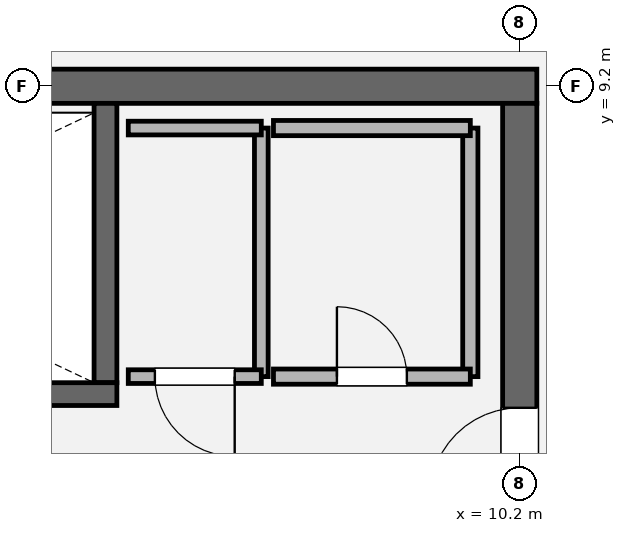
"""IFC4 building model, lengths in metres.
Left out: names, types, materials, properties, quantities, classifications, styles, units other than length and angle.
Written with IfcOpenShell. Run it as: python <this file> out.ifc"""

import sys

from ifc_helpers import new_model, si_unit, direction, frame, frame_2d, origin, place, context, subcontext, project, spatial, rectangle, extrude, element, fill, save


model = new_model("IFC4")
c1 = context("Model", 3, precision=1e-05, world=origin(), true_north=direction((0.0, 1.0)))
c2 = subcontext(c1, "Body", "Model", "MODEL_VIEW")
j1 = project(units=[si_unit("LENGTHUNIT", "METRE"), si_unit("PLANEANGLEUNIT", "RADIAN")], contexts=[c1])
p1 = place(None, origin())
s1 = spatial("IfcSite", under=j1, at=p1, CompositionType="ELEMENT")
p2 = place(p1, origin())
s2 = spatial("IfcBuilding", under=s1, at=p2, CompositionType="ELEMENT")
p3 = place(p2, frame((0.0, 0.0, 317.4)))
s3 = spatial("IfcBuildingStorey", under=s2, at=p3, CompositionType="ELEMENT", Elevation=317.4)
p4 = place(p3, frame((-10.425, 9.2, 0.0), z_axis=(0.0, 0.0, 1.0), x_axis=(1.0, 0.0, 0.0)))
e1 = element("IfcWall", 1, at=p4, inside=s3, PredefinedType="SHEAR", context=c2, shape_type="SweptSolid", body=[
    extrude(rectangle(XDim=20.85, YDim=0.45, at=frame_2d((10.425, 0.0))), origin(), (0.0, 0.0, 1.0), 4.2),
])
p5 = place(p3, frame((10.2, 8.975, 0.0), z_axis=(0.0, 0.0, 1.0), x_axis=(0.0, -1.0, 0.0)))
e2 = element("IfcWall", 2, at=p5, inside=s3, PredefinedType="SHEAR", context=c2, shape_type="SweptSolid", body=[
    extrude(rectangle(XDim=17.95, YDim=0.45, at=frame_2d((8.975, 0.0))), origin(), (0.0, 0.0, 1.0), 4.2),
])
p6 = place(p5, frame((4.005, 0.0, 0.0)))
e3 = element("IfcOpeningElement", 3, at=p6, cuts=e2, PredefinedType="OPENING", context=c2, shape_type="SweptSolid", body=[
    extrude(rectangle(XDim=1.18, YDim=2.2, at=frame_2d((0.59, 1.1))), frame((0.0, 0.235, 0.0), z_axis=(0.0, -1.0, 0.0), x_axis=(1.0, 0.0, 0.0)), (0.0, 0.0, 1.0), 0.47),
])
p7 = place(p3, frame((4.75, 8.975, 0.0), z_axis=(0.0, 0.0, 1.0), x_axis=(0.0, -1.0, 0.0)))
e4 = element("IfcWall", 4, at=p7, inside=s3, PredefinedType="SOLIDWALL", context=c2, shape_type="SweptSolid", body=[
    extrude(rectangle(XDim=3.675, YDim=0.3, at=frame_2d((1.837, 0.0))), origin(), (0.0, 0.0, 1.0), 4.2),
])
p8 = place(p3, frame((-4.9, 5.15, 0.0), z_axis=(0.0, 0.0, 1.0), x_axis=(1.0, 0.0, 0.0)))
e5 = element("IfcWall", 5, at=p8, inside=s3, PredefinedType="SOLIDWALL", context=c2, shape_type="SweptSolid", body=[
    extrude(rectangle(XDim=9.8, YDim=0.3, at=frame_2d((4.9, 0.0))), origin(), (0.0, 0.0, 1.0), 4.2),
])
p9 = place(p8, frame((0.56, 0.0, 0.0)))
e6 = element("IfcOpeningElement", 6, at=p9, cuts=e5, PredefinedType="OPENING", context=c2, shape_type="SweptSolid", body=[
    extrude(rectangle(XDim=1.18, YDim=2.2, at=frame_2d((0.59, 1.1))), frame((0.0, 0.16, 0.0), z_axis=(0.0, -1.0, 0.0), x_axis=(1.0, 0.0, 0.0)), (0.0, 0.0, 1.0), 0.32),
])
p10 = place(p3, frame((6.8, 5.38, 0.0), z_axis=(0.0, 0.0, 1.0), x_axis=(0.0, 1.0, 0.0)))
e7 = element("IfcWall", 7, at=p10, inside=s3, PredefinedType="PARTITIONING", context=c2, shape_type="SweptSolid", body=[
    extrude(rectangle(XDim=3.27, YDim=0.18, at=frame_2d((1.635, 0.0))), origin(), (0.0, 0.0, 1.0), 4.0),
])
p11 = place(p3, frame((6.8, 8.65, 0.0), z_axis=(0.0, 0.0, 1.0), x_axis=(-1.0, 0.0, 0.0)))
e8 = element("IfcWall", 8, at=p11, inside=s3, PredefinedType="PARTITIONING", context=c2, shape_type="SweptSolid", body=[
    extrude(rectangle(XDim=1.75, YDim=0.18, at=frame_2d((0.875, 0.0))), origin(), (0.0, 0.0, 1.0), 4.0),
])
p12 = place(p3, frame((5.05, 5.38, 0.0), z_axis=(0.0, 0.0, 1.0), x_axis=(1.0, 0.0, 0.0)))
e9 = element("IfcWall", 9, at=p12, inside=s3, PredefinedType="PARTITIONING", context=c2, shape_type="SweptSolid", body=[
    extrude(rectangle(XDim=1.75, YDim=0.18, at=frame_2d((0.875, 0.0))), origin(), (0.0, 0.0, 1.0), 4.0),
])
p13 = place(p12, frame((0.35, 0.0, 0.0)))
e10 = element("IfcOpeningElement", 10, at=p13, cuts=e9, PredefinedType="OPENING", context=c2, shape_type="SweptSolid", body=[
    extrude(rectangle(XDim=1.05, YDim=2.2, at=frame_2d((0.525, 1.1))), frame((0.0, 0.1, 0.0), z_axis=(0.0, -1.0, 0.0), x_axis=(1.0, 0.0, 0.0)), (0.0, 0.0, 1.0), 0.2),
])
p14 = place(p3, frame((9.55, 5.38, 0.0), z_axis=(0.0, 0.0, 1.0), x_axis=(0.0, 1.0, 0.0)))
e11 = element("IfcWall", 11, at=p14, inside=s3, PredefinedType="SOLIDWALL", context=c2, shape_type="SweptSolid", body=[
    extrude(rectangle(XDim=3.27, YDim=0.2, at=frame_2d((1.635, 0.0))), origin(), (0.0, 0.0, 1.0), 4.0),
])
p15 = place(p3, frame((9.55, 8.65, 0.0), z_axis=(0.0, 0.0, 1.0), x_axis=(-1.0, 0.0, 0.0)))
e12 = element("IfcWall", 12, at=p15, inside=s3, PredefinedType="SOLIDWALL", context=c2, shape_type="SweptSolid", body=[
    extrude(rectangle(XDim=2.59, YDim=0.2, at=frame_2d((1.295, 0.0))), origin(), (0.0, 0.0, 1.0), 4.0),
])
p16 = place(p3, frame((6.96, 5.38, 0.0), z_axis=(0.0, 0.0, 1.0), x_axis=(1.0, 0.0, 0.0)))
e13 = element("IfcWall", 13, at=p16, inside=s3, PredefinedType="SOLIDWALL", context=c2, shape_type="SweptSolid", body=[
    extrude(rectangle(XDim=2.59, YDim=0.2, at=frame_2d((1.295, 0.0))), origin(), (0.0, 0.0, 1.0), 4.0),
])
p17 = place(p16, frame((0.835, 0.0, 0.0)))
e14 = element("IfcOpeningElement", 14, at=p17, cuts=e13, PredefinedType="OPENING", context=c2, shape_type="SweptSolid", body=[
    extrude(rectangle(XDim=0.92, YDim=2.1, at=frame_2d((0.46, 1.05))), frame((0.0, 0.11, 0.0), z_axis=(0.0, -1.0, 0.0), x_axis=(1.0, 0.0, 0.0)), (0.0, 0.0, 1.0), 0.22),
])
p18 = place(p6, origin())
e15 = element("IfcDoor", 15, at=p18, inside=s3, OperationType="SINGLE_SWING_RIGHT", PredefinedType="DOOR", context=c2, shape_type="SweptSolid", body=[
    extrude(rectangle(XDim=1.18, YDim=2.2, at=frame_2d((0.59, 1.1))), frame((0.0, 0.025, 0.0), z_axis=(0.0, -1.0, 0.0), x_axis=(1.0, 0.0, 0.0)), (0.0, 0.0, 1.0), 0.05),
])
fill(e3, e15)
p19 = place(p13, origin())
e16 = element("IfcDoor", 16, at=p19, inside=s3, OperationType="SINGLE_SWING_RIGHT", PredefinedType="DOOR", context=c2, shape_type="SweptSolid", body=[
    extrude(rectangle(XDim=1.05, YDim=2.2, at=frame_2d((0.525, 1.1))), frame((0.0, 0.025, 0.0), z_axis=(0.0, -1.0, 0.0), x_axis=(1.0, 0.0, 0.0)), (0.0, 0.0, 1.0), 0.05),
])
fill(e10, e16)
p20 = place(p17, origin())
e17 = element("IfcDoor", 17, at=p20, inside=s3, OperationType="SINGLE_SWING_LEFT", PredefinedType="DOOR", context=c2, shape_type="SweptSolid", body=[
    extrude(rectangle(XDim=0.92, YDim=2.1, at=frame_2d((0.46, 1.05))), frame((0.0, 0.025, 0.0), z_axis=(0.0, -1.0, 0.0), x_axis=(1.0, 0.0, 0.0)), (0.0, 0.0, 1.0), 0.05),
])
fill(e14, e17)
save(model, sys.argv[1])
